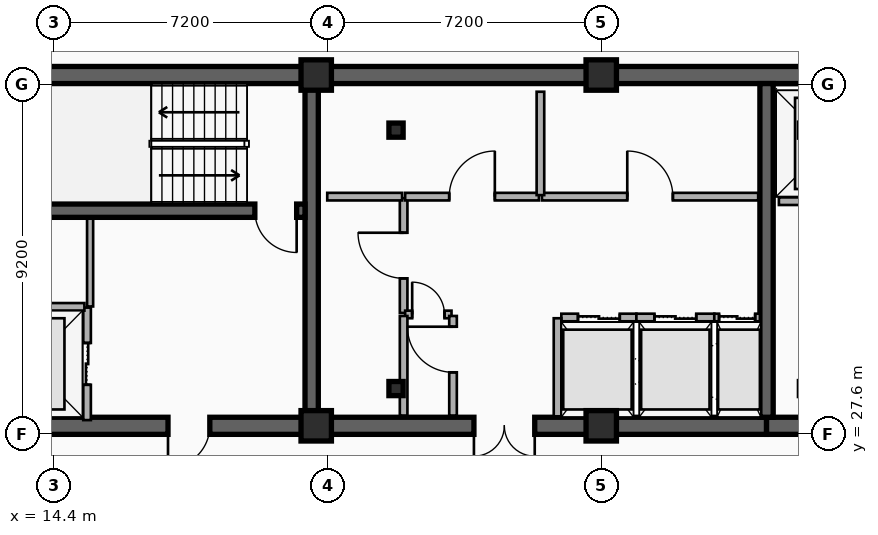
"""IFC4 building model, lengths in metres.
Left out: names, types, materials, properties, quantities, classifications, styles, units other than length and angle.
Written with IfcOpenShell. Run it as: python <this file> out.ifc"""

import sys

from ifc_helpers import new_model, si_unit, direction, frame, frame_2d, origin, origin_2d, place, context, subcontext, project, spatial, rectangle, i_section, extrude, element, fill, save


model = new_model("IFC4")
c1 = context("Model", 3, precision=1e-05, world=origin(), true_north=direction((0.0, 1.0)))
c2 = subcontext(c1, "Body", "Model", "MODEL_VIEW")
j1 = project(units=[si_unit("LENGTHUNIT", "METRE"), si_unit("PLANEANGLEUNIT", "RADIAN")], contexts=[c1])
p1 = place(None, origin())
s1 = spatial("IfcSite", under=j1, at=p1, CompositionType="ELEMENT")
p2 = place(p1, origin())
s2 = spatial("IfcBuilding", under=s1, at=p2, CompositionType="ELEMENT")
p3 = place(p2, frame((0.0, 0.0, 262.1)))
s3 = spatial("IfcBuildingStorey", under=s2, at=p3, CompositionType="ELEMENT", Elevation=262.1)
p4 = place(p3, frame((12.15, 37.05, 0.0), z_axis=(0.0, 0.0, 1.0), x_axis=(1.0, 0.0, 0.0)))
e1 = element("IfcWall", 1, at=p4, inside=s3, PredefinedType="SHEAR", context=c2, shape_type="SweptSolid", body=[
    extrude(rectangle(XDim=33.23, YDim=0.45, at=frame_2d((16.615, 0.0))), origin(), (0.0, 0.0, 1.0), 3.7),
])
p5 = place(p3, frame((21.18, 27.82, 0.0), z_axis=(0.0, 0.0, 1.0), x_axis=(-1.0, 0.0, 0.0)))
e2 = element("IfcWall", 2, at=p5, inside=s3, PredefinedType="SHEAR", context=c2, shape_type="SweptSolid", body=[
    extrude(rectangle(XDim=9.03, YDim=0.45, at=frame_2d((4.515, 0.0))), origin(), (0.0, 0.0, 1.0), 3.7),
])
p6 = place(p5, frame((2.68, 0.0, 0.0)))
e3 = element("IfcOpeningElement", 3, at=p6, cuts=e2, PredefinedType="OPENING", context=c2, shape_type="SweptSolid", body=[
    extrude(rectangle(XDim=1.1, YDim=2.15, at=frame_2d((0.55, 1.075))), frame((0.0, 0.235, 0.0), z_axis=(0.0, -1.0, 0.0), x_axis=(1.0, 0.0, 0.0)), (0.0, 0.0, 1.0), 0.47),
])
p7 = place(p3, frame((33.15, 27.82, 0.0), z_axis=(0.0, 0.0, 1.0), x_axis=(-1.0, 0.0, 0.0)))
e4 = element("IfcWall", 4, at=p7, inside=s3, PredefinedType="SHEAR", context=c2, shape_type="SweptSolid", body=[
    extrude(rectangle(XDim=11.97, YDim=0.45, at=frame_2d((5.985, 0.0))), origin(), (0.0, 0.0, 1.0), 3.7),
])
p8 = place(p7, frame((6.1, 0.0, 0.0)))
e5 = element("IfcOpeningElement", 5, at=p8, cuts=e4, PredefinedType="OPENING", context=c2, shape_type="SweptSolid", body=[
    extrude(rectangle(XDim=1.6, YDim=2.2, at=frame_2d((0.8, 1.1))), frame((0.0, 0.235, 0.0), z_axis=(0.0, -1.0, 0.0), x_axis=(1.0, 0.0, 0.0)), (0.0, 0.0, 1.0), 0.47),
])
p9 = place(p3, frame((45.38, 27.82, 0.0), z_axis=(0.0, 0.0, 1.0), x_axis=(-1.0, 0.0, 0.0)))
e6 = element("IfcWall", 6, at=p9, inside=s3, PredefinedType="SHEAR", context=c2, shape_type="SweptSolid", body=[
    extrude(rectangle(XDim=12.23, YDim=0.45, at=frame_2d((6.115, 0.0))), origin(), (0.0, 0.0, 1.0), 3.7),
])
p10 = place(p9, frame((9.93, 0.0, 0.0)))
e7 = element("IfcOpeningElement", 7, at=p10, cuts=e6, PredefinedType="OPENING", context=c2, shape_type="SweptSolid", body=[
    extrude(rectangle(XDim=1.1, YDim=2.15, at=frame_2d((0.55, 1.075))), frame((0.0, 0.235, 0.0), z_axis=(0.0, -1.0, 0.0), x_axis=(1.0, 0.0, 0.0)), (0.0, 0.0, 1.0), 0.47),
])
p11 = place(p9, frame((6.23, 0.0, 0.0)))
e8 = element("IfcOpeningElement", 8, at=p11, cuts=e6, PredefinedType="OPENING", context=c2, shape_type="SweptSolid", body=[
    extrude(rectangle(XDim=1.1, YDim=2.15, at=frame_2d((0.55, 1.075))), frame((0.0, 0.235, 0.0), z_axis=(0.0, -1.0, 0.0), x_axis=(1.0, 0.0, 0.0)), (0.0, 0.0, 1.0), 0.47),
])
for number, where, z_axis, x_axis in (
    (9, (21.18, 28.045, 0.0), (0.0, 0.0, 1.0), (0.0, 1.0, 0.0)),
    (10, (33.15, 28.045, 0.0), (0.0, 0.0, 1.0), (0.0, 1.0, 0.0)),
):
    element("IfcWall", number, at=place(p3, frame(where, z_axis=z_axis, x_axis=x_axis)), inside=s3, PredefinedType="SHEAR", context=c2, shape_type="SweptSolid", body=[
        extrude(rectangle(XDim=8.78, YDim=0.35, at=frame_2d((4.39, 0.0))), origin(), (0.0, 0.0, 1.0), 3.7),
    ])
p12 = place(p3, frame((21.005, 33.48, 0.0), z_axis=(0.0, 0.0, 1.0), x_axis=(-1.0, 0.0, 0.0)))
e11 = element("IfcWall", 11, at=p12, inside=s3, PredefinedType="SHEAR", context=c2, shape_type="SweptSolid", body=[
    extrude(rectangle(XDim=8.63, YDim=0.35, at=frame_2d((4.315, 0.0))), origin(), (0.0, 0.0, 1.0), 3.7),
])
p13 = place(p12, frame((0.22, 0.0, 0.0)))
e12 = element("IfcOpeningElement", 12, at=p13, cuts=e11, PredefinedType="OPENING", context=c2, shape_type="SweptSolid", body=[
    extrude(rectangle(XDim=1.1, YDim=2.15, at=frame_2d((0.55, 1.075))), frame((0.0, 0.185, 0.0), z_axis=(0.0, -1.0, 0.0), x_axis=(1.0, 0.0, 0.0)), (0.0, 0.0, 1.0), 0.37),
])
for number, where, z_axis, x_axis in (
    (13, (23.4, 28.8, 0.0), (0.0, 0.0, 1.0), (1.0, 0.0, 0.0)),
    (14, (23.4, 35.6, 0.0), (0.0, 0.0, 1.0), (1.0, 0.0, 0.0)),
):
    element("IfcColumn", number, at=place(p3, frame(where, z_axis=z_axis, x_axis=x_axis)), inside=s3, PredefinedType="COLUMN", context=c2, shape_type="SweptSolid", body=[
        extrude(i_section(OverallWidth=0.374, OverallDepth=0.372, WebThickness=0.017, FlangeThickness=0.027, FilletRadius=0.015, at=origin_2d()), origin(), (0.0, 0.0, 1.0), 3.7),
    ])
for number, where, z_axis, x_axis in (
    (15, (21.3, 27.82, 0.0), (0.0, 0.0, 1.0), (1.0, 0.0, 0.0)),
    (16, (21.3, 37.05, 0.0), (0.0, 0.0, 1.0), (1.0, 0.0, 0.0)),
    (17, (28.8, 27.82, 0.0), (0.0, 0.0, 1.0), (1.0, 0.0, 0.0)),
    (18, (28.8, 37.05, 0.0), (0.0, 0.0, 1.0), (1.0, 0.0, 0.0)),
):
    element("IfcColumn", number, at=place(p3, frame(where, z_axis=z_axis, x_axis=x_axis)), inside=s3, PredefinedType="COLUMN", context=c2, shape_type="SweptSolid", body=[
        extrude(rectangle(XDim=0.8, YDim=0.8, at=origin_2d()), origin(), (0.0, 0.0, 1.0), 3.7),
    ])
p14 = place(p3, frame((15.27, 27.97, 0.0), z_axis=(0.0, 0.0, 1.0), x_axis=(0.0, 1.0, 0.0)))
e19 = element("IfcWall", 19, at=p14, inside=s3, PredefinedType="PARTITIONING", context=c2, shape_type="SweptSolid", body=[
    extrude(rectangle(XDim=2.96, YDim=0.2, at=frame_2d((1.48, 0.0))), origin(), (0.0, 0.0, 1.0), 2.49),
])
p15 = place(p14, frame((0.93, 0.0, 0.0)))
e20 = element("IfcOpeningElement", 20, at=p15, cuts=e19, PredefinedType="OPENING", context=c2, shape_type="SweptSolid", body=[
    extrude(rectangle(XDim=1.1, YDim=2.15, at=frame_2d((0.55, 1.075))), frame((0.0, 0.11, 0.0), z_axis=(0.0, -1.0, 0.0), x_axis=(1.0, 0.0, 0.0)), (0.0, 0.0, 1.0), 0.22),
])
p16 = place(p3, frame((12.45, 30.95, 0.0), z_axis=(0.0, 0.0, 1.0), x_axis=(1.0, 0.0, 0.0)))
e21 = element("IfcWall", 21, at=p16, inside=s3, PredefinedType="PARTITIONING", context=c2, shape_type="SweptSolid", body=[
    extrude(rectangle(XDim=2.75, YDim=0.2, at=frame_2d((1.375, 0.0))), origin(), (0.0, 0.0, 1.0), 2.49),
])
p17 = place(p3, frame((33.475, 33.73, 0.0), z_axis=(0.0, 0.0, 1.0), x_axis=(1.0, 0.0, 0.0)))
e22 = element("IfcWall", 22, at=p17, inside=s3, PredefinedType="PARTITIONING", context=c2, shape_type="SweptSolid", body=[
    extrude(rectangle(XDim=2.725, YDim=0.2, at=frame_2d((1.362, 0.0))), origin(), (0.0, 0.0, 1.0), 2.49),
])
p18 = place(p17, frame((0.812, 0.0, 0.0)))
e23 = element("IfcOpeningElement", 23, at=p18, cuts=e22, PredefinedType="OPENING", context=c2, shape_type="SweptSolid", body=[
    extrude(rectangle(XDim=1.1, YDim=2.15, at=frame_2d((0.55, 1.075))), frame((0.0, 0.11, 0.0), z_axis=(0.0, -1.0, 0.0), x_axis=(1.0, 0.0, 0.0)), (0.0, 0.0, 1.0), 0.22),
])
p19 = place(p3, frame((27.75, 30.67, 0.0), z_axis=(0.0, 0.0, 1.0), x_axis=(1.0, 0.0, 0.0)))
e24 = element("IfcWall", 24, at=p19, inside=s3, PredefinedType="PARTITIONING", context=c2, shape_type="SweptSolid", body=[
    extrude(rectangle(XDim=1.975, YDim=0.2, at=frame_2d((0.988, 0.0))), origin(), (0.0, 0.0, 1.0), 2.49),
])
p20 = place(p19, frame((0.438, 0.0, 0.0)))
e25 = element("IfcOpeningElement", 25, at=p20, cuts=e24, PredefinedType="OPENING", context=c2, shape_type="SweptSolid", body=[
    extrude(rectangle(XDim=1.1, YDim=2.15, at=frame_2d((0.55, 1.075))), frame((0.0, 0.11, 0.0), z_axis=(0.0, -1.0, 0.0), x_axis=(1.0, 0.0, 0.0)), (0.0, 0.0, 1.0), 0.22),
])
p21 = place(p3, frame((27.65, 28.07, 0.0), z_axis=(0.0, 0.0, 1.0), x_axis=(0.0, 1.0, 0.0)))
e26 = element("IfcWall", 26, at=p21, inside=s3, PredefinedType="PARTITIONING", context=c2, shape_type="SweptSolid", body=[
    extrude(rectangle(XDim=2.58, YDim=0.2, at=frame_2d((1.29, 0.0))), origin(), (0.0, 0.0, 1.0), 2.49),
])
p22 = place(p3, frame((29.725, 30.67, 0.0), z_axis=(0.0, 0.0, 1.0), x_axis=(1.0, 0.0, 0.0)))
e27 = element("IfcWall", 27, at=p22, inside=s3, PredefinedType="PARTITIONING", context=c2, shape_type="SweptSolid", body=[
    extrude(rectangle(XDim=2.05, YDim=0.2, at=frame_2d((1.025, 0.0))), origin(), (0.0, 0.0, 1.0), 2.8),
])
p23 = place(p22, frame((0.475, 0.0, 0.0)))
e28 = element("IfcOpeningElement", 28, at=p23, cuts=e27, PredefinedType="OPENING", context=c2, shape_type="SweptSolid", body=[
    extrude(rectangle(XDim=1.1, YDim=2.15, at=frame_2d((0.55, 1.075))), frame((0.0, 0.11, 0.0), z_axis=(0.0, -1.0, 0.0), x_axis=(1.0, 0.0, 0.0)), (0.0, 0.0, 1.0), 0.22),
])
p24 = place(p3, frame((31.775, 30.67, 0.0), z_axis=(0.0, 0.0, 1.0), x_axis=(1.0, 0.0, 0.0)))
e29 = element("IfcWall", 29, at=p24, inside=s3, PredefinedType="PARTITIONING", context=c2, shape_type="SweptSolid", body=[
    extrude(rectangle(XDim=1.2, YDim=0.2, at=frame_2d((0.6, 0.0))), origin(), (0.0, 0.0, 1.0), 2.8),
])
p25 = place(p24, frame((0.125, 0.0, 0.0)))
e30 = element("IfcOpeningElement", 30, at=p25, cuts=e29, PredefinedType="OPENING", context=c2, shape_type="SweptSolid", body=[
    extrude(rectangle(XDim=0.95, YDim=2.15, at=frame_2d((0.475, 1.075))), frame((0.0, 0.11, 0.0), z_axis=(0.0, -1.0, 0.0), x_axis=(1.0, 0.0, 0.0)), (0.0, 0.0, 1.0), 0.22),
])
p26 = place(p3, frame((23.6, 30.79, 0.0), z_axis=(0.0, 0.0, 1.0), x_axis=(0.0, 1.0, 0.0)))
e31 = element("IfcWall", 31, at=p26, inside=s3, PredefinedType="PARTITIONING", context=c2, shape_type="SweptSolid", body=[
    extrude(rectangle(XDim=3.02, YDim=0.2, at=frame_2d((1.51, 0.0))), origin(), (0.0, 0.0, 1.0), 3.42),
])
p27 = place(p26, frame((0.91, 0.0, 0.0)))
e32 = element("IfcOpeningElement", 32, at=p27, cuts=e31, PredefinedType="OPENING", context=c2, shape_type="SweptSolid", body=[
    extrude(rectangle(XDim=1.2, YDim=2.15, at=frame_2d((0.6, 1.075))), frame((0.0, 0.11, 0.0), z_axis=(0.0, -1.0, 0.0), x_axis=(1.0, 0.0, 0.0)), (0.0, 0.0, 1.0), 0.22),
])
p28 = place(p3, frame((23.64, 30.75, 0.0), z_axis=(0.0, 0.0, 1.0), x_axis=(1.0, 0.0, 0.0)))
e33 = element("IfcWall", 33, at=p28, inside=s3, PredefinedType="PARTITIONING", context=c2, shape_type="SweptSolid", body=[
    extrude(rectangle(XDim=1.22, YDim=0.2, at=frame_2d((0.61, 0.0))), origin(), (0.0, 0.0, 1.0), 3.42),
])
p29 = place(p28, frame((0.185, 0.0, 0.0)))
e34 = element("IfcOpeningElement", 34, at=p29, cuts=e33, PredefinedType="OPENING", context=c2, shape_type="SweptSolid", body=[
    extrude(rectangle(XDim=0.85, YDim=2.1, at=frame_2d((0.425, 1.05))), frame((0.0, 0.11, 0.0), z_axis=(0.0, -1.0, 0.0), x_axis=(1.0, 0.0, 0.0)), (0.0, 0.0, 1.0), 0.22),
])
p30 = place(p3, frame((23.64, 33.85, 0.0), z_axis=(0.0, 0.0, 1.0), x_axis=(1.0, 0.0, 0.0)))
e35 = element("IfcWall", 35, at=p30, inside=s3, PredefinedType="PARTITIONING", context=c2, shape_type="SweptSolid", body=[
    extrude(rectangle(XDim=3.52, YDim=0.2, at=frame_2d((1.76, 0.0))), origin(), (0.0, 0.0, 1.0), 3.42),
])
p31 = place(p30, frame((1.16, 0.0, 0.0)))
e36 = element("IfcOpeningElement", 36, at=p31, cuts=e35, PredefinedType="OPENING", context=c2, shape_type="SweptSolid", body=[
    extrude(rectangle(XDim=1.2, YDim=2.15, at=frame_2d((0.6, 1.075))), frame((0.0, 0.11, 0.0), z_axis=(0.0, -1.0, 0.0), x_axis=(1.0, 0.0, 0.0)), (0.0, 0.0, 1.0), 0.22),
])
p32 = place(p3, frame((27.24, 33.85, 0.0), z_axis=(0.0, 0.0, 1.0), x_axis=(1.0, 0.0, 0.0)))
e37 = element("IfcWall", 37, at=p32, inside=s3, PredefinedType="PARTITIONING", context=c2, shape_type="SweptSolid", body=[
    extrude(rectangle(XDim=5.69, YDim=0.2, at=frame_2d((2.845, 0.0))), origin(), (0.0, 0.0, 1.0), 2.49),
])
p33 = place(p32, frame((2.245, 0.0, 0.0)))
e38 = element("IfcOpeningElement", 38, at=p33, cuts=e37, PredefinedType="OPENING", context=c2, shape_type="SweptSolid", body=[
    extrude(rectangle(XDim=1.2, YDim=2.15, at=frame_2d((0.6, 1.075))), frame((0.0, 0.11, 0.0), z_axis=(0.0, -1.0, 0.0), x_axis=(1.0, 0.0, 0.0)), (0.0, 0.0, 1.0), 0.22),
])
p34 = place(p3, frame((24.9, 28.09, 0.0), z_axis=(0.0, 0.0, 1.0), x_axis=(0.0, 1.0, 0.0)))
e39 = element("IfcWall", 39, at=p34, inside=s3, PredefinedType="PARTITIONING", context=c2, shape_type="SweptSolid", body=[
    extrude(rectangle(XDim=2.62, YDim=0.2, at=frame_2d((1.31, 0.0))), origin(), (0.0, 0.0, 1.0), 2.8),
])
p35 = place(p34, frame((1.137, 0.0, 0.0)))
e40 = element("IfcOpeningElement", 40, at=p35, cuts=e39, PredefinedType="OPENING", context=c2, shape_type="SweptSolid", body=[
    extrude(rectangle(XDim=1.2, YDim=2.15, at=frame_2d((0.6, 1.075))), frame((0.0, 0.11, 0.0), z_axis=(0.0, -1.0, 0.0), x_axis=(1.0, 0.0, 0.0)), (0.0, 0.0, 1.0), 0.22),
])
p36 = place(p3, frame((23.6, 28.09, 0.0), z_axis=(0.0, 0.0, 1.0), x_axis=(0.0, 1.0, 0.0)))
e41 = element("IfcWall", 41, at=p36, inside=s3, PredefinedType="PARTITIONING", context=c2, shape_type="SweptSolid", body=[
    extrude(rectangle(XDim=2.62, YDim=0.2, at=frame_2d((1.31, 0.0))), origin(), (0.0, 0.0, 1.0), 2.8),
])
p37 = place(p3, frame((21.59, 33.85, 0.0), z_axis=(0.0, 0.0, 1.0), x_axis=(1.0, 0.0, 0.0)))
e42 = element("IfcWall", 42, at=p37, inside=s3, PredefinedType="PARTITIONING", context=c2, shape_type="SweptSolid", body=[
    extrude(rectangle(XDim=1.97, YDim=0.2, at=frame_2d((0.985, 0.0))), origin(), (0.0, 0.0, 1.0), 2.49),
])
p38 = place(p3, frame((27.2, 33.89, 0.0), z_axis=(0.0, 0.0, 1.0), x_axis=(0.0, 1.0, 0.0)))
e43 = element("IfcWall", 43, at=p38, inside=s3, PredefinedType="PARTITIONING", context=c2, shape_type="SweptSolid", body=[
    extrude(rectangle(XDim=2.72, YDim=0.2, at=frame_2d((1.36, 0.0))), origin(), (0.0, 0.0, 1.0), 3.42),
])
p39 = place(p3, frame((15.35, 30.96, 0.0), z_axis=(0.0, 0.0, 1.0), x_axis=(0.0, 1.0, 0.0)))
e44 = element("IfcWall", 44, at=p39, inside=s3, PredefinedType="PARTITIONING", context=c2, shape_type="SweptSolid", body=[
    extrude(rectangle(XDim=2.31, YDim=0.16, at=frame_2d((1.155, 0.0))), origin(), (0.0, 0.0, 1.0), 3.42),
])
p40 = place(p15, origin())
e45 = element("IfcDoor", 45, at=p40, inside=s3, OperationType="DOUBLE_DOOR_SLIDING", PredefinedType="DOOR", context=c2, shape_type="SweptSolid", body=[
    extrude(rectangle(XDim=1.1, YDim=2.15, at=frame_2d((0.55, 1.075))), frame((0.0, 0.025, 0.0), z_axis=(0.0, -1.0, 0.0), x_axis=(1.0, 0.0, 0.0)), (0.0, 0.0, 1.0), 0.05),
])
fill(e20, e45)
p41 = place(p20, origin())
e46 = element("IfcDoor", 46, at=p41, inside=s3, OperationType="DOUBLE_DOOR_SLIDING", PredefinedType="DOOR", context=c2, shape_type="SweptSolid", body=[
    extrude(rectangle(XDim=1.1, YDim=2.15, at=frame_2d((0.55, 1.075))), frame((0.0, 0.025, 0.0), z_axis=(0.0, -1.0, 0.0), x_axis=(1.0, 0.0, 0.0)), (0.0, 0.0, 1.0), 0.05),
])
fill(e25, e46)
p42 = place(p23, origin())
e47 = element("IfcDoor", 47, at=p42, inside=s3, OperationType="DOUBLE_DOOR_SLIDING", PredefinedType="DOOR", context=c2, shape_type="SweptSolid", body=[
    extrude(rectangle(XDim=1.1, YDim=2.15, at=frame_2d((0.55, 1.075))), frame((0.0, 0.025, 0.0), z_axis=(0.0, -1.0, 0.0), x_axis=(1.0, 0.0, 0.0)), (0.0, 0.0, 1.0), 0.05),
])
fill(e28, e47)
p43 = place(p25, origin())
e48 = element("IfcDoor", 48, at=p43, inside=s3, OperationType="DOUBLE_DOOR_SLIDING", PredefinedType="DOOR", context=c2, shape_type="SweptSolid", body=[
    extrude(rectangle(XDim=0.95, YDim=2.15, at=frame_2d((0.475, 1.075))), frame((0.0, 0.025, 0.0), z_axis=(0.0, -1.0, 0.0), x_axis=(1.0, 0.0, 0.0)), (0.0, 0.0, 1.0), 0.05),
])
fill(e30, e48)
p44 = place(p13, origin())
e49 = element("IfcDoor", 49, at=p44, inside=s3, OperationType="SINGLE_SWING_LEFT", PredefinedType="DOOR", context=c2, shape_type="SweptSolid", body=[
    extrude(rectangle(XDim=1.1, YDim=2.15, at=frame_2d((0.55, 1.075))), frame((0.0, 0.025, 0.0), z_axis=(0.0, -1.0, 0.0), x_axis=(1.0, 0.0, 0.0)), (0.0, 0.0, 1.0), 0.05),
])
fill(e12, e49)
p45 = place(p6, origin())
e50 = element("IfcDoor", 50, at=p45, inside=s3, OperationType="SINGLE_SWING_RIGHT", PredefinedType="DOOR", context=c2, shape_type="SweptSolid", body=[
    extrude(rectangle(XDim=1.1, YDim=2.15, at=frame_2d((0.55, 1.075))), frame((0.0, 0.025, 0.0), z_axis=(0.0, -1.0, 0.0), x_axis=(1.0, 0.0, 0.0)), (0.0, 0.0, 1.0), 0.05),
])
fill(e3, e50)
p46 = place(p8, origin())
e51 = element("IfcDoor", 51, at=p46, inside=s3, OperationType="SINGLE_SWING_LEFT", PredefinedType="DOOR", context=c2, shape_type="SweptSolid", body=[
    extrude(rectangle(XDim=1.6, YDim=2.2, at=frame_2d((0.8, 1.1))), frame((0.0, 0.025, 0.0), z_axis=(0.0, -1.0, 0.0), x_axis=(1.0, 0.0, 0.0)), (0.0, 0.0, 1.0), 0.05),
])
fill(e5, e51)
p47 = place(p27, origin())
e52 = element("IfcDoor", 52, at=p47, inside=s3, OperationType="SINGLE_SWING_RIGHT", PredefinedType="DOOR", context=c2, shape_type="SweptSolid", body=[
    extrude(rectangle(XDim=1.2, YDim=2.15, at=frame_2d((0.6, 1.075))), frame((0.0, 0.025, 0.0), z_axis=(0.0, -1.0, 0.0), x_axis=(1.0, 0.0, 0.0)), (0.0, 0.0, 1.0), 0.05),
])
fill(e32, e52)
p48 = place(p29, origin())
e53 = element("IfcDoor", 53, at=p48, inside=s3, OperationType="SINGLE_SWING_LEFT", PredefinedType="DOOR", context=c2, shape_type="SweptSolid", body=[
    extrude(rectangle(XDim=0.85, YDim=2.1, at=frame_2d((0.425, 1.05))), frame((0.0, 0.025, 0.0), z_axis=(0.0, -1.0, 0.0), x_axis=(1.0, 0.0, 0.0)), (0.0, 0.0, 1.0), 0.05),
])
fill(e34, e53)
p49 = place(p31, origin())
e54 = element("IfcDoor", 54, at=p49, inside=s3, OperationType="SINGLE_SWING_RIGHT", PredefinedType="DOOR", context=c2, shape_type="SweptSolid", body=[
    extrude(rectangle(XDim=1.2, YDim=2.15, at=frame_2d((0.6, 1.075))), frame((0.0, 0.025, 0.0), z_axis=(0.0, -1.0, 0.0), x_axis=(1.0, 0.0, 0.0)), (0.0, 0.0, 1.0), 0.05),
])
fill(e36, e54)
p50 = place(p33, origin())
e55 = element("IfcDoor", 55, at=p50, inside=s3, OperationType="SINGLE_SWING_LEFT", PredefinedType="DOOR", context=c2, shape_type="SweptSolid", body=[
    extrude(rectangle(XDim=1.2, YDim=2.15, at=frame_2d((0.6, 1.075))), frame((0.0, 0.025, 0.0), z_axis=(0.0, -1.0, 0.0), x_axis=(1.0, 0.0, 0.0)), (0.0, 0.0, 1.0), 0.05),
])
fill(e38, e55)
p51 = place(p35, origin())
e56 = element("IfcDoor", 56, at=p51, inside=s3, OperationType="SINGLE_SWING_RIGHT", PredefinedType="DOOR", context=c2, shape_type="SweptSolid", body=[
    extrude(rectangle(XDim=1.2, YDim=2.15, at=frame_2d((0.6, 1.075))), frame((0.0, 0.025, 0.0), z_axis=(0.0, -1.0, 0.0), x_axis=(1.0, 0.0, 0.0)), (0.0, 0.0, 1.0), 0.05),
])
fill(e40, e56)
save(model, sys.argv[1])
